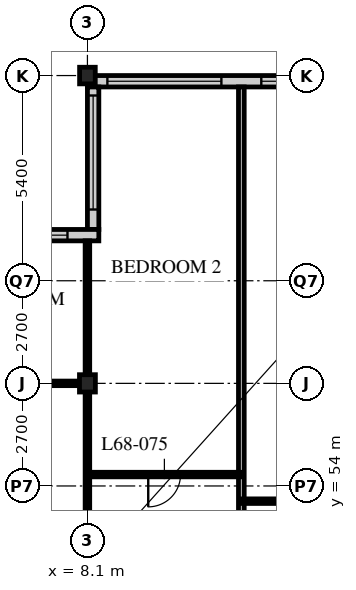
"""IFC4 building model, lengths in metres.
Left out: names, types, materials, properties, quantities, classifications, styles, units other than length and angle.
Written with IfcOpenShell. Run it as: python <this file> out.ifc"""

import sys

from ifc_helpers import new_model, si_unit, direction, frame, frame_2d, origin, origin_2d, place, context, subcontext, project, spatial, rectangle, i_section, extrude, element, fill, save


model = new_model("IFC4")
c1 = context("Model", 3, precision=1e-05, world=origin(), true_north=direction((0.0, 1.0)))
c2 = subcontext(c1, "Body", "Model", "MODEL_VIEW")
j1 = project(units=[si_unit("LENGTHUNIT", "METRE"), si_unit("PLANEANGLEUNIT", "RADIAN")], contexts=[c1])
p1 = place(None, origin())
s1 = spatial("IfcSite", under=j1, at=p1, CompositionType="ELEMENT")
p2 = place(p1, origin())
s2 = spatial("IfcBuilding", under=s1, at=p2, CompositionType="ELEMENT")
p3 = place(p2, frame((0.0, 0.0, 265.8)))
s3 = spatial("IfcBuildingStorey", under=s2, at=p3, CompositionType="ELEMENT", Elevation=265.8)
p4 = place(p3, frame((8.1, 56.7, 0.0), z_axis=(0.0, 0.0, 1.0), x_axis=(1.0, 0.0, 0.0)))
e1 = element("IfcColumn", 1, at=p4, inside=s3, PredefinedType="COLUMN", context=c2, shape_type="SweptSolid", body=[
    extrude(i_section(OverallWidth=0.418, OverallDepth=0.456, WebThickness=0.042, FlangeThickness=0.067, FilletRadius=0.015, at=origin_2d()), origin(), (0.0, 0.0, 1.0), 3.9),
])
p5 = place(p3, frame((8.1, 64.8, 0.0), z_axis=(0.0, 0.0, 1.0), x_axis=(1.0, 0.0, 0.0)))
e2 = element("IfcColumn", 2, at=p5, inside=s3, PredefinedType="COLUMN", context=c2, shape_type="SweptSolid", body=[
    extrude(i_section(OverallWidth=0.412, OverallDepth=0.437, WebThickness=0.036, FlangeThickness=0.058, FilletRadius=0.015, at=origin_2d()), origin(), (0.0, 0.0, 1.0), 3.9),
])
p6 = place(p3, frame((48.3, 64.65, 0.0), z_axis=(0.0, 0.0, 1.0), x_axis=(-1.0, 0.0, 0.0)))
e3 = element("IfcWall", 3, at=p6, inside=s3, PredefinedType="SOLIDWALL", context=c2, shape_type="SweptSolid", body=[
    extrude(rectangle(XDim=40.2, YDim=0.3, at=frame_2d((20.1, 0.0))), origin(), (0.0, 0.0, 1.0), 3.69),
])
p7 = place(p6, frame((0.225, 0.0, 0.6)))
e4 = element("IfcOpeningElement", 4, at=p7, cuts=e3, PredefinedType="OPENING", context=c2, shape_type="SweptSolid", body=[
    extrude(rectangle(XDim=3.0, YDim=2.4, at=frame_2d((1.5, 1.2))), frame((0.0, 0.16, 0.0), z_axis=(0.0, -1.0, 0.0), x_axis=(1.0, 0.0, 0.0)), (0.0, 0.0, 1.0), 0.32),
])
p8 = place(p6, frame((4.275, 0.0, 0.6)))
e5 = element("IfcOpeningElement", 5, at=p8, cuts=e3, PredefinedType="OPENING", context=c2, shape_type="SweptSolid", body=[
    extrude(rectangle(XDim=3.0, YDim=2.4, at=frame_2d((1.5, 1.2))), frame((0.0, 0.16, 0.0), z_axis=(0.0, -1.0, 0.0), x_axis=(1.0, 0.0, 0.0)), (0.0, 0.0, 1.0), 0.32),
])
p9 = place(p6, frame((8.325, 0.0, 0.6)))
e6 = element("IfcOpeningElement", 6, at=p9, cuts=e3, PredefinedType="OPENING", context=c2, shape_type="SweptSolid", body=[
    extrude(rectangle(XDim=3.0, YDim=2.4, at=frame_2d((1.5, 1.2))), frame((0.0, 0.16, 0.0), z_axis=(0.0, -1.0, 0.0), x_axis=(1.0, 0.0, 0.0)), (0.0, 0.0, 1.0), 0.32),
])
p10 = place(p6, frame((12.375, 0.0, 0.6)))
e7 = element("IfcOpeningElement", 7, at=p10, cuts=e3, PredefinedType="OPENING", context=c2, shape_type="SweptSolid", body=[
    extrude(rectangle(XDim=3.0, YDim=2.4, at=frame_2d((1.5, 1.2))), frame((0.0, 0.16, 0.0), z_axis=(0.0, -1.0, 0.0), x_axis=(1.0, 0.0, 0.0)), (0.0, 0.0, 1.0), 0.32),
])
p11 = place(p6, frame((16.425, 0.0, 0.6)))
e8 = element("IfcOpeningElement", 8, at=p11, cuts=e3, PredefinedType="OPENING", context=c2, shape_type="SweptSolid", body=[
    extrude(rectangle(XDim=3.0, YDim=2.4, at=frame_2d((1.5, 1.2))), frame((0.0, 0.16, 0.0), z_axis=(0.0, -1.0, 0.0), x_axis=(1.0, 0.0, 0.0)), (0.0, 0.0, 1.0), 0.32),
])
p12 = place(p6, frame((20.475, 0.0, 0.6)))
e9 = element("IfcOpeningElement", 9, at=p12, cuts=e3, PredefinedType="OPENING", context=c2, shape_type="SweptSolid", body=[
    extrude(rectangle(XDim=3.0, YDim=2.4, at=frame_2d((1.5, 1.2))), frame((0.0, 0.16, 0.0), z_axis=(0.0, -1.0, 0.0), x_axis=(1.0, 0.0, 0.0)), (0.0, 0.0, 1.0), 0.32),
])
p13 = place(p6, frame((24.525, 0.0, 0.6)))
e10 = element("IfcOpeningElement", 10, at=p13, cuts=e3, PredefinedType="OPENING", context=c2, shape_type="SweptSolid", body=[
    extrude(rectangle(XDim=3.0, YDim=2.4, at=frame_2d((1.5, 1.2))), frame((0.0, 0.16, 0.0), z_axis=(0.0, -1.0, 0.0), x_axis=(1.0, 0.0, 0.0)), (0.0, 0.0, 1.0), 0.32),
])
p14 = place(p6, frame((28.575, 0.0, 0.6)))
e11 = element("IfcOpeningElement", 11, at=p14, cuts=e3, PredefinedType="OPENING", context=c2, shape_type="SweptSolid", body=[
    extrude(rectangle(XDim=3.0, YDim=2.4, at=frame_2d((1.5, 1.2))), frame((0.0, 0.16, 0.0), z_axis=(0.0, -1.0, 0.0), x_axis=(1.0, 0.0, 0.0)), (0.0, 0.0, 1.0), 0.32),
])
p15 = place(p6, frame((32.625, 0.0, 0.6)))
e12 = element("IfcOpeningElement", 12, at=p15, cuts=e3, PredefinedType="OPENING", context=c2, shape_type="SweptSolid", body=[
    extrude(rectangle(XDim=3.0, YDim=2.4, at=frame_2d((1.5, 1.2))), frame((0.0, 0.16, 0.0), z_axis=(0.0, -1.0, 0.0), x_axis=(1.0, 0.0, 0.0)), (0.0, 0.0, 1.0), 0.32),
])
p16 = place(p6, frame((36.675, 0.0, 0.6)))
e13 = element("IfcOpeningElement", 13, at=p16, cuts=e3, PredefinedType="OPENING", context=c2, shape_type="SweptSolid", body=[
    extrude(rectangle(XDim=3.0, YDim=2.4, at=frame_2d((1.5, 1.2))), frame((0.0, 0.16, 0.0), z_axis=(0.0, -1.0, 0.0), x_axis=(1.0, 0.0, 0.0)), (0.0, 0.0, 1.0), 0.32),
])
p17 = place(p3, frame((8.25, 64.5, 0.0), z_axis=(0.0, 0.0, 1.0), x_axis=(0.0, -1.0, 0.0)))
e14 = element("IfcWall", 14, at=p17, inside=s3, PredefinedType="SOLIDWALL", context=c2, shape_type="SweptSolid", body=[
    extrude(rectangle(XDim=3.75, YDim=0.3, at=frame_2d((1.875, 0.0))), origin(), (0.0, 0.0, 1.0), 3.69),
])
p18 = place(p17, frame((0.225, 0.0, 0.6)))
e15 = element("IfcOpeningElement", 15, at=p18, cuts=e14, PredefinedType="OPENING", context=c2, shape_type="SweptSolid", body=[
    extrude(rectangle(XDim=3.0, YDim=2.3, at=frame_2d((1.5, 1.15))), frame((0.0, 0.16, 0.0), z_axis=(0.0, -1.0, 0.0), x_axis=(1.0, 0.0, 0.0)), (0.0, 0.0, 1.0), 0.32),
])
p19 = place(p3, frame((8.4, 60.6, 0.0), z_axis=(0.0, 0.0, 1.0), x_axis=(-1.0, 0.0, 0.0)))
e16 = element("IfcWall", 16, at=p19, inside=s3, PredefinedType="SOLIDWALL", context=c2, shape_type="SweptSolid", body=[
    extrude(rectangle(XDim=4.35, YDim=0.3, at=frame_2d((2.175, 0.0))), origin(), (0.0, 0.0, 1.0), 3.69),
])
p20 = place(p19, frame((0.825, 0.0, 0.6)))
e17 = element("IfcOpeningElement", 17, at=p20, cuts=e16, PredefinedType="OPENING", context=c2, shape_type="SweptSolid", body=[
    extrude(rectangle(XDim=3.0, YDim=2.3, at=frame_2d((1.5, 1.15))), frame((0.0, 0.16, 0.0), z_axis=(0.0, -1.0, 0.0), x_axis=(1.0, 0.0, 0.0)), (0.0, 0.0, 1.0), 0.32),
])
p21 = place(p3, frame((8.1, 51.0, 0.0), z_axis=(0.0, 0.0, 1.0), x_axis=(0.0, 1.0, 0.0)))
e18 = element("IfcWall", 18, at=p21, inside=s3, PredefinedType="PARTITIONING", context=c2, shape_type="SweptSolid", body=[
    extrude(rectangle(XDim=9.45, YDim=0.12, at=frame_2d((4.725, 0.0))), origin(), (0.0, 0.0, 1.0), 3.078),
])
p22 = place(p3, frame((8.1, 56.7, 0.0), z_axis=(0.0, 0.0, 1.0), x_axis=(-1.0, 0.0, 0.0)))
e19 = element("IfcWall", 19, at=p22, inside=s3, PredefinedType="PARTITIONING", context=c2, shape_type="SweptSolid", body=[
    extrude(rectangle(XDim=3.75, YDim=0.12, at=frame_2d((1.875, 0.0))), origin(), (0.0, 0.0, 1.0), 3.078),
])
p23 = place(p22, frame((1.875, 0.0, 0.0)))
e20 = element("IfcOpeningElement", 20, at=p23, cuts=e19, PredefinedType="OPENING", context=c2, shape_type="SweptSolid", body=[
    extrude(rectangle(XDim=0.85, YDim=2.1, at=frame_2d((0.425, 1.05))), frame((0.0, 0.07, 0.0), z_axis=(0.0, -1.0, 0.0), x_axis=(1.0, 0.0, 0.0)), (0.0, 0.0, 1.0), 0.14),
])
p24 = place(p3, frame((12.15, 48.6, 0.0), z_axis=(0.0, 0.0, 1.0), x_axis=(0.0, 1.0, 0.0)))
e21 = element("IfcWall", 21, at=p24, inside=s3, PredefinedType="PARTITIONING", context=c2, shape_type="SweptSolid", body=[
    extrude(rectangle(XDim=15.9, YDim=0.15, at=frame_2d((7.95, 0.0))), origin(), (0.0, 0.0, 1.0), 3.69),
])
p25 = place(p3, frame((12.15, 53.6, 0.0), z_axis=(0.0, 0.0, 1.0), x_axis=(1.0, 0.0, 0.0)))
e22 = element("IfcWall", 22, at=p25, inside=s3, PredefinedType="PARTITIONING", context=c2, shape_type="SweptSolid", body=[
    extrude(rectangle(XDim=8.1, YDim=0.12, at=frame_2d((4.05, 0.0))), origin(), (0.0, 0.0, 1.0), 3.69),
])
p26 = place(p25, frame((1.675, 0.0, 0.0)))
e23 = element("IfcOpeningElement", 23, at=p26, cuts=e22, PredefinedType="OPENING", context=c2, shape_type="SweptSolid", body=[
    extrude(rectangle(XDim=0.85, YDim=2.1, at=frame_2d((0.425, 1.05))), frame((0.0, 0.07, 0.0), z_axis=(0.0, -1.0, 0.0), x_axis=(1.0, 0.0, 0.0)), (0.0, 0.0, 1.0), 0.14),
])
p27 = place(p3, frame((8.1, 54.3, 0.0), z_axis=(0.0, 0.0, 1.0), x_axis=(1.0, 0.0, 0.0)))
e24 = element("IfcWall", 24, at=p27, inside=s3, PredefinedType="PARTITIONING", context=c2, shape_type="SweptSolid", body=[
    extrude(rectangle(XDim=4.05, YDim=0.12, at=frame_2d((2.025, 0.0))), origin(), (0.0, 0.0, 1.0), 3.69),
])
p28 = place(p27, frame((1.6, 0.0, 0.0)))
e25 = element("IfcOpeningElement", 25, at=p28, cuts=e24, PredefinedType="OPENING", context=c2, shape_type="SweptSolid", body=[
    extrude(rectangle(XDim=0.85, YDim=2.1, at=frame_2d((0.425, 1.05))), frame((0.0, 0.07, 0.0), z_axis=(0.0, -1.0, 0.0), x_axis=(1.0, 0.0, 0.0)), (0.0, 0.0, 1.0), 0.14),
])
p29 = place(p15, origin())
e26 = element("IfcWindow", 26, at=p29, inside=s3, PartitioningType="SINGLE_PANEL", PredefinedType="WINDOW", context=c2, shape_type="SweptSolid", body=[
    extrude(rectangle(XDim=3.0, YDim=2.4, at=frame_2d((1.5, 1.2))), frame((0.0, 0.03, 0.0), z_axis=(0.0, -1.0, 0.0), x_axis=(1.0, 0.0, 0.0)), (0.0, 0.0, 1.0), 0.06),
])
fill(e12, e26)
p30 = place(p16, origin())
e27 = element("IfcWindow", 27, at=p30, inside=s3, PartitioningType="SINGLE_PANEL", PredefinedType="WINDOW", context=c2, shape_type="SweptSolid", body=[
    extrude(rectangle(XDim=3.0, YDim=2.4, at=frame_2d((1.5, 1.2))), frame((0.0, 0.03, 0.0), z_axis=(0.0, -1.0, 0.0), x_axis=(1.0, 0.0, 0.0)), (0.0, 0.0, 1.0), 0.06),
])
fill(e13, e27)
p31 = place(p18, origin())
e28 = element("IfcWindow", 28, at=p31, inside=s3, PartitioningType="SINGLE_PANEL", PredefinedType="WINDOW", context=c2, shape_type="SweptSolid", body=[
    extrude(rectangle(XDim=3.0, YDim=2.3, at=frame_2d((1.5, 1.15))), frame((0.0, 0.03, 0.0), z_axis=(0.0, -1.0, 0.0), x_axis=(1.0, 0.0, 0.0)), (0.0, 0.0, 1.0), 0.06),
])
fill(e15, e28)
p32 = place(p20, origin())
e29 = element("IfcWindow", 29, at=p32, inside=s3, PartitioningType="SINGLE_PANEL", PredefinedType="WINDOW", context=c2, shape_type="SweptSolid", body=[
    extrude(rectangle(XDim=3.0, YDim=2.3, at=frame_2d((1.5, 1.15))), frame((0.0, 0.03, 0.0), z_axis=(0.0, -1.0, 0.0), x_axis=(1.0, 0.0, 0.0)), (0.0, 0.0, 1.0), 0.06),
])
fill(e17, e29)
p33 = place(p28, origin())
e30 = element("IfcDoor", 30, at=p33, inside=s3, OperationType="SINGLE_SWING_RIGHT", PredefinedType="DOOR", context=c2, shape_type="SweptSolid", body=[
    extrude(rectangle(XDim=0.85, YDim=2.1, at=frame_2d((0.425, 1.05))), frame((0.0, 0.025, 0.0), z_axis=(0.0, -1.0, 0.0), x_axis=(1.0, 0.0, 0.0)), (0.0, 0.0, 1.0), 0.05),
])
fill(e25, e30)
save(model, sys.argv[1])
